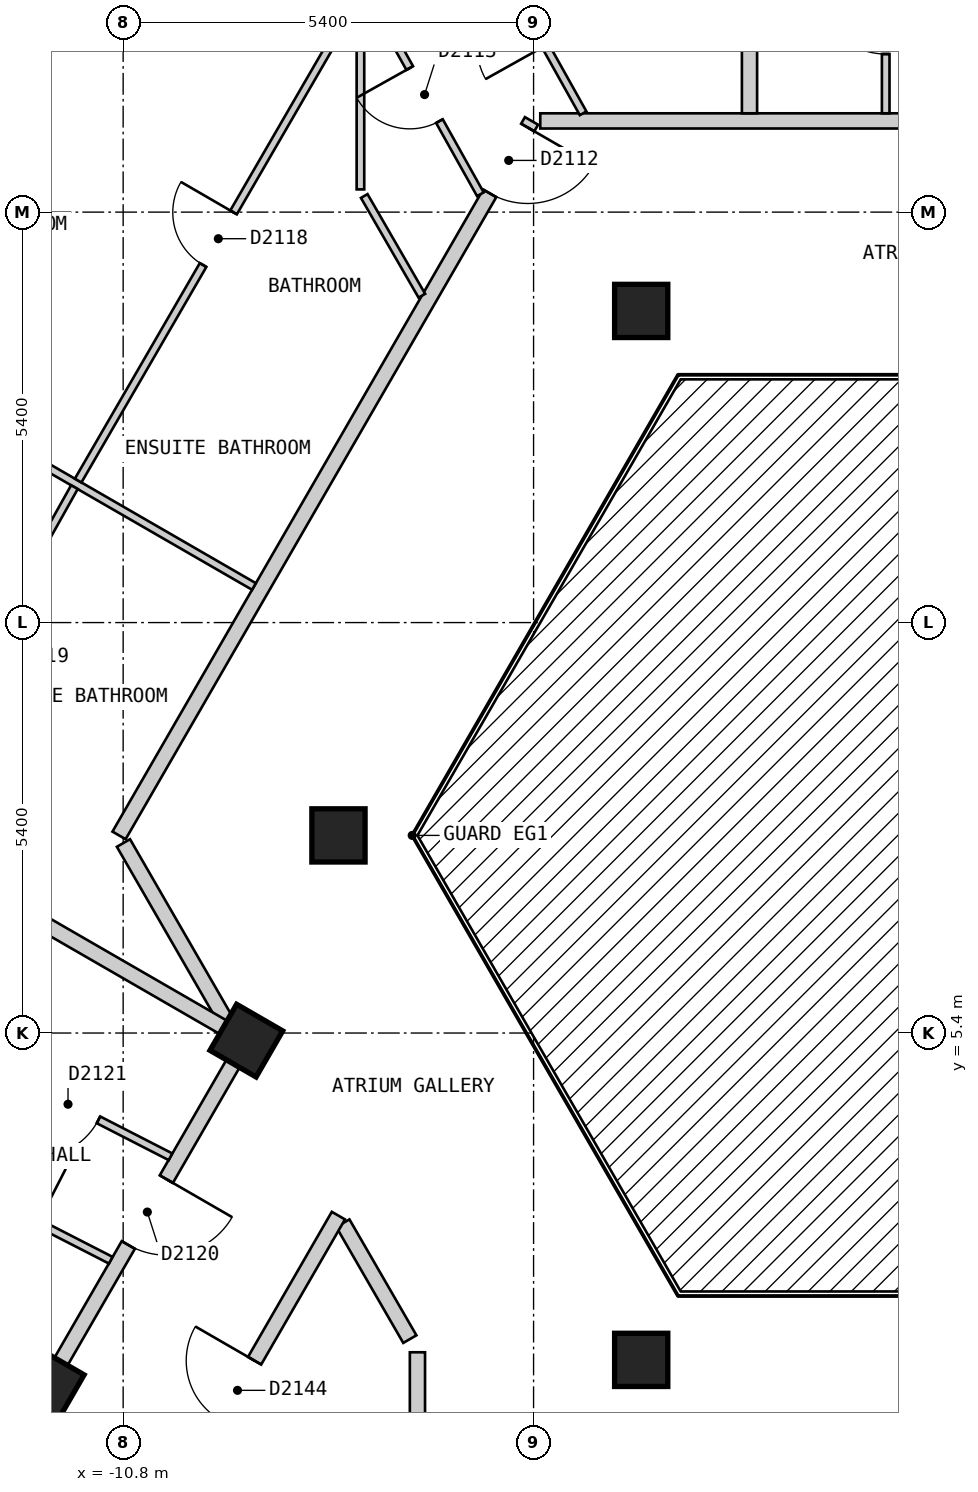
"""IFC4 building model, lengths in metres.
Left out: names, types, materials, properties, quantities, classifications, styles, units other than length and angle.
Written with IfcOpenShell. Run it as: python <this file> out.ifc"""

import sys

from ifc_helpers import new_model, si_unit, direction, frame, frame_2d, origin, origin_2d, place, context, subcontext, project, spatial, rectangle, extrude, element, fill, save


model = new_model("IFC4")
c1 = context("Model", 3, precision=1e-05, world=origin(), true_north=direction((0.0, 1.0)))
c2 = subcontext(c1, "Body", "Model", "MODEL_VIEW")
j1 = project(units=[si_unit("LENGTHUNIT", "METRE"), si_unit("PLANEANGLEUNIT", "RADIAN")], contexts=[c1])
p1 = place(None, origin())
s1 = spatial("IfcSite", under=j1, at=p1, CompositionType="ELEMENT")
p2 = place(p1, origin())
s2 = spatial("IfcBuilding", under=s1, at=p2, CompositionType="ELEMENT")
p3 = place(p2, frame((0.0, 0.0, 205.8)))
s3 = spatial("IfcBuildingStorey", under=s2, at=p3, CompositionType="ELEMENT", Elevation=205.8)
for number, where, z_axis, x_axis in (
    (1, (-3.984, 14.9, 0.0), (0.0, 0.0, 1.0), (1.0, 0.0, 0.0)),
    (2, (-7.967, 8.0, 0.0), (0.0, 0.0, 1.0), (1.0, 0.0, 0.0)),
    (3, (-9.179, 5.3, 0.0), (0.0, 0.0, 1.0), (-0.5, -0.866, 0.0)),
    (4, (-3.984, 1.1, 0.0), (0.0, 0.0, 1.0), (1.0, 0.0, 0.0)),
    (5, (-11.792, 0.775, 0.0), (0.0, 0.0, 1.0), (-0.5, -0.866, 0.0)),
):
    element("IfcColumn", number, at=place(p3, frame(where, z_axis=z_axis, x_axis=x_axis)), inside=s3, PredefinedType="COLUMN", context=c2, shape_type="SweptSolid", body=[
        extrude(rectangle(XDim=0.7, YDim=0.7, at=origin_2d()), origin(), (0.0, 0.0, 1.0), 3.0),
    ])
p4 = place(p3, frame((-10.796, 7.9, 0.0), z_axis=(0.0, 0.0, 1.0), x_axis=(0.499698840221, -0.866199208659, 0.0)))
e6 = element("IfcWall", 6, at=p4, inside=s3, PredefinedType="PARTITIONING", context=c2, shape_type="SweptSolid", body=[
    extrude(rectangle(XDim=2.685, YDim=0.2, at=frame_2d((1.343, 0.0))), origin(), (0.0, 0.0, 1.0), 2.7),
])
p5 = place(p3, frame((-7.909, 2.898, 0.0), z_axis=(0.0, 0.0, 1.0), x_axis=(0.50019444547, -0.865913111531, 0.0)))
e7 = element("IfcWall", 7, at=p5, inside=s3, PredefinedType="PARTITIONING", context=c2, shape_type="SweptSolid", body=[
    extrude(rectangle(XDim=1.761, YDim=0.2, at=frame_2d((0.88, 0.0))), origin(), (0.0, 0.0, 1.0), 2.7),
])
p6 = place(p3, frame((-5.312, 17.4, 0.0), z_axis=(0.0, 0.0, 1.0), x_axis=(1.0, 0.0, 0.0)))
e8 = element("IfcWall", 8, at=p6, inside=s3, PredefinedType="PARTITIONING", context=c2, shape_type="SweptSolid", body=[
    extrude(rectangle(XDim=10.739, YDim=0.2, at=frame_2d((5.37, 0.0))), origin(), (0.0, 0.0, 1.0), 2.7),
])
p7 = place(p6, frame((9.534, 0.0, 0.0)))
e9 = element("IfcOpeningElement", 9, at=p7, cuts=e8, PredefinedType="OPENING", context=c2, shape_type="SweptSolid", body=[
    extrude(rectangle(XDim=1.0, YDim=2.1, at=frame_2d((0.5, 1.05))), frame((0.0, 0.11, 0.0), z_axis=(0.0, -1.0, 0.0), x_axis=(1.0, 0.0, 0.0)), (0.0, 0.0, 1.0), 0.22),
])
p8 = place(p6, frame((4.812, 0.0, 0.0)))
e10 = element("IfcOpeningElement", 10, at=p8, cuts=e8, PredefinedType="OPENING", context=c2, shape_type="SweptSolid", body=[
    extrude(rectangle(XDim=1.0, YDim=2.1, at=frame_2d((0.5, 1.05))), frame((0.0, 0.11, 0.0), z_axis=(0.0, -1.0, 0.0), x_axis=(1.0, 0.0, 0.0)), (0.0, 0.0, 1.0), 0.22),
])
p9 = place(p3, frame((-10.623, -1.6, 0.0), z_axis=(0.0, 0.0, 1.0), x_axis=(0.500040865889, 0.866001808567, 0.0)))
e11 = element("IfcWall", 11, at=p9, inside=s3, PredefinedType="PARTITIONING", context=c2, shape_type="SweptSolid", body=[
    extrude(rectangle(XDim=5.31, YDim=0.2, at=frame_2d((2.655, 0.0))), origin(), (0.0, 0.0, 1.0), 2.7),
])
p10 = place(p9, frame((2.205, 0.0, 0.0)))
e12 = element("IfcOpeningElement", 12, at=p10, cuts=e11, PredefinedType="OPENING", context=c2, shape_type="SweptSolid", body=[
    extrude(rectangle(XDim=0.9, YDim=2.1, at=frame_2d((0.45, 1.05))), frame((0.0, 0.11, 0.0), z_axis=(0.0, -1.0, 0.0), x_axis=(1.0, 0.0, 0.0)), (0.0, 0.0, 1.0), 0.22),
])
p11 = place(p3, frame((-13.106, -1.5, 0.0), z_axis=(0.0, 0.0, 1.0), x_axis=(0.500025705601, 0.86601056214, 0.0)))
e13 = element("IfcWall", 13, at=p11, inside=s3, PredefinedType="PARTITIONING", context=c2, shape_type="SweptSolid", body=[
    extrude(rectangle(XDim=7.735, YDim=0.2, at=frame_2d((3.868, 0.0))), origin(), (0.0, 0.0, 1.0), 2.7),
])
p12 = place(p11, frame((4.748, 0.0, 0.0)))
e14 = element("IfcOpeningElement", 14, at=p12, cuts=e13, PredefinedType="OPENING", context=c2, shape_type="SweptSolid", body=[
    extrude(rectangle(XDim=1.0, YDim=2.1, at=frame_2d((0.5, 1.05))), frame((0.0, 0.11, 0.0), z_axis=(0.0, -1.0, 0.0), x_axis=(1.0, 0.0, 0.0)), (0.0, 0.0, 1.0), 0.22),
])
p13 = place(p3, frame((-10.854, 8.0, 0.0), z_axis=(0.0, 0.0, 1.0), x_axis=(0.499997637144, 0.866026767976, 0.0)))
e15 = element("IfcWall", 15, at=p13, inside=s3, PredefinedType="PARTITIONING", context=c2, shape_type="SweptSolid", body=[
    extrude(rectangle(XDim=10.854, YDim=0.2, at=frame_2d((5.427, 0.0))), origin(), (0.0, 0.0, 1.0), 2.7),
])
p14 = place(p13, frame((9.754, 0.0, 0.0)))
e16 = element("IfcOpeningElement", 16, at=p14, cuts=e15, PredefinedType="OPENING", context=c2, shape_type="SweptSolid", body=[
    extrude(rectangle(XDim=1.0, YDim=2.1, at=frame_2d((0.5, 1.05))), frame((0.0, 0.11, 0.0), z_axis=(0.0, -1.0, 0.0), x_axis=(1.0, 0.0, 0.0)), (0.0, 0.0, 1.0), 0.22),
])
p15 = place(p3, frame((-6.928, -2.799, 0.0), z_axis=(0.0, 0.0, 1.0), x_axis=(0.0, 1.0, 0.0)))
e17 = element("IfcWall", 17, at=p15, inside=s3, PredefinedType="PARTITIONING", context=c2, shape_type="SweptSolid", body=[
    extrude(rectangle(XDim=3.999, YDim=0.2, at=frame_2d((2.0, 0.0))), origin(), (0.0, 0.0, 1.0), 2.7),
])
p16 = place(p3, frame((-7.628, 16.412, 0.0), z_axis=(0.0, 0.0, 1.0), x_axis=(0.500159472144, -0.86593331292, 0.0)))
e18 = element("IfcWall", 18, at=p16, inside=s3, PredefinedType="PARTITIONING", context=c2, shape_type="SweptSolid", body=[
    extrude(rectangle(XDim=1.515, YDim=0.1, at=frame_2d((0.758, 0.0))), origin(), (0.0, 0.0, 1.0), 2.7),
])
p17 = place(p3, frame((-6.211, 20.115, 0.0), z_axis=(0.0, 0.0, 1.0), x_axis=(0.488221234931, -0.872719901092, 0.0)))
e19 = element("IfcWall", 19, at=p17, inside=s3, PredefinedType="PARTITIONING", context=c2, shape_type="SweptSolid", body=[
    extrude(rectangle(XDim=2.996, YDim=0.1, at=frame_2d((1.498, 0.0))), origin(), (0.0, 0.0, 1.0), 2.7),
])
p18 = place(p17, frame((1.077, 0.0, 0.0)))
e20 = element("IfcOpeningElement", 20, at=p18, cuts=e19, PredefinedType="OPENING", context=c2, shape_type="SweptSolid", body=[
    extrude(rectangle(XDim=0.9, YDim=2.1, at=frame_2d((0.45, 1.05))), frame((0.0, 0.06, 0.0), z_axis=(0.0, -1.0, 0.0), x_axis=(1.0, 0.0, 0.0)), (0.0, 0.0, 1.0), 0.12),
])
p19 = place(p3, frame((-7.575, 19.07, 0.0), z_axis=(0.0, 0.0, 1.0), x_axis=(0.488413788688, -0.872612153834, 0.0)))
e21 = element("IfcWall", 21, at=p19, inside=s3, PredefinedType="PARTITIONING", context=c2, shape_type="SweptSolid", body=[
    extrude(rectangle(XDim=3.02, YDim=0.1, at=frame_2d((1.51, 0.0))), origin(), (0.0, 0.0, 1.0), 2.7),
])
p20 = place(p19, frame((1.117, 0.0, 0.0)))
e22 = element("IfcOpeningElement", 22, at=p20, cuts=e21, PredefinedType="OPENING", context=c2, shape_type="SweptSolid", body=[
    extrude(rectangle(XDim=0.8, YDim=2.1, at=frame_2d((0.4, 1.05))), frame((0.0, 0.06, 0.0), z_axis=(0.0, -1.0, 0.0), x_axis=(1.0, 0.0, 0.0)), (0.0, 0.0, 1.0), 0.12),
])
p21 = place(p3, frame((-12.917, 5.177, 0.0), z_axis=(0.0, 0.0, 1.0), x_axis=(0.889829844516, -0.456292502467, 0.0)))
e23 = element("IfcWall", 23, at=p21, inside=s3, PredefinedType="PARTITIONING", context=c2, shape_type="SweptSolid", body=[
    extrude(rectangle(XDim=3.079, YDim=0.1, at=frame_2d((1.54, 0.0))), origin(), (0.0, 0.0, 1.0), 2.7),
])
p22 = place(p21, frame((1.114, 0.0, 0.0)))
e24 = element("IfcOpeningElement", 24, at=p22, cuts=e23, PredefinedType="OPENING", context=c2, shape_type="SweptSolid", body=[
    extrude(rectangle(XDim=0.9, YDim=2.1, at=frame_2d((0.45, 1.05))), frame((0.0, 0.06, 0.0), z_axis=(0.0, -1.0, 0.0), x_axis=(1.0, 0.0, 0.0)), (0.0, 0.0, 1.0), 0.12),
])
p23 = place(p3, frame((-13.634, 3.78, 0.0), z_axis=(0.0, 0.0, 1.0), x_axis=(0.889908901513, -0.456138298116, 0.0)))
e25 = element("IfcWall", 25, at=p23, inside=s3, PredefinedType="PARTITIONING", context=c2, shape_type="SweptSolid", body=[
    extrude(rectangle(XDim=3.002, YDim=0.1, at=frame_2d((1.501, 0.0))), origin(), (0.0, 0.0, 1.0), 2.7),
])
p24 = place(p23, frame((1.126, 0.0, 0.0)))
e26 = element("IfcOpeningElement", 26, at=p24, cuts=e25, PredefinedType="OPENING", context=c2, shape_type="SweptSolid", body=[
    extrude(rectangle(XDim=0.8, YDim=2.1, at=frame_2d((0.4, 1.05))), frame((0.0, 0.06, 0.0), z_axis=(0.0, -1.0, 0.0), x_axis=(1.0, 0.0, 0.0)), (0.0, 0.0, 1.0), 0.12),
])
p25 = place(p3, frame((-15.314, 14.875, 0.0), z_axis=(0.0, 0.0, 1.0), x_axis=(0.866001485781, -0.500041424909, 0.0)))
e27 = element("IfcWall", 27, at=p25, inside=s3, PredefinedType="PARTITIONING", context=c2, shape_type="SweptSolid", body=[
    extrude(rectangle(XDim=7.2, YDim=0.1, at=frame_2d((3.6, 0.0))), origin(), (0.0, 0.0, 1.0), 2.7),
])
p26 = place(p25, frame((1.8, 0.0, 0.0)))
e28 = element("IfcOpeningElement", 28, at=p26, cuts=e27, PredefinedType="OPENING", context=c2, shape_type="SweptSolid", body=[
    extrude(rectangle(XDim=0.9, YDim=2.1, at=frame_2d((0.45, 1.05))), frame((0.0, 0.06, 0.0), z_axis=(0.0, -1.0, 0.0), x_axis=(1.0, 0.0, 0.0)), (0.0, 0.0, 1.0), 0.12),
])
p27 = place(p3, frame((-11.392, 12.668, 0.0), z_axis=(0.0, 0.0, 1.0), x_axis=(0.501440551074, 0.865192102217, 0.0)))
e29 = element("IfcWall", 29, at=p27, inside=s3, PredefinedType="PARTITIONING", context=c2, shape_type="SweptSolid", body=[
    extrude(rectangle(XDim=7.307, YDim=0.1, at=frame_2d((3.654, 0.0))), origin(), (0.0, 0.0, 1.0), 2.7),
])
p28 = place(p27, frame((3.278, 0.0, 0.0)))
e30 = element("IfcOpeningElement", 30, at=p28, cuts=e29, PredefinedType="OPENING", context=c2, shape_type="SweptSolid", body=[
    extrude(rectangle(XDim=0.8, YDim=2.1, at=frame_2d((0.4, 1.05))), frame((0.0, 0.06, 0.0), z_axis=(0.0, -1.0, 0.0), x_axis=(1.0, 0.0, 0.0)), (0.0, 0.0, 1.0), 0.12),
])
p29 = place(p3, frame((-13.921, 8.153, 0.0), z_axis=(0.0, 0.0, 1.0), x_axis=(0.488568218554, 0.872525699231, 0.0)))
e31 = element("IfcWall", 31, at=p29, inside=s3, PredefinedType="PARTITIONING", context=c2, shape_type="SweptSolid", body=[
    extrude(rectangle(XDim=5.076, YDim=0.1, at=frame_2d((2.538, 0.0))), origin(), (0.0, 0.0, 1.0), 2.7),
])
p30 = place(p29, frame((2.113, 0.0, 0.0)))
e32 = element("IfcOpeningElement", 32, at=p30, cuts=e31, PredefinedType="OPENING", context=c2, shape_type="SweptSolid", body=[
    extrude(rectangle(XDim=0.8, YDim=2.1, at=frame_2d((0.4, 1.05))), frame((0.0, 0.06, 0.0), z_axis=(0.0, -1.0, 0.0), x_axis=(1.0, 0.0, 0.0)), (0.0, 0.0, 1.0), 0.12),
])
p31 = place(p3, frame((-7.678, 16.499, 0.0), z_axis=(0.0, 0.0, 1.0), x_axis=(0.0, 1.0, 0.0)))
e33 = element("IfcWall", 33, at=p31, inside=s3, PredefinedType="PARTITIONING", context=c2, shape_type="SweptSolid", body=[
    extrude(rectangle(XDim=5.801, YDim=0.1, at=frame_2d((2.9, 0.0))), origin(), (0.0, 0.0, 1.0), 2.7),
])
p32 = place(p31, frame((3.44, 0.0, 0.0)))
e34 = element("IfcOpeningElement", 34, at=p32, cuts=e33, PredefinedType="OPENING", context=c2, shape_type="SweptSolid", body=[
    extrude(rectangle(XDim=0.9, YDim=2.1, at=frame_2d((0.45, 1.05))), frame((0.0, 0.06, 0.0), z_axis=(0.0, -1.0, 0.0), x_axis=(1.0, 0.0, 0.0)), (0.0, 0.0, 1.0), 0.12),
])
p33 = place(p3, frame((-0.767, 17.5, 0.0), z_axis=(0.0, 0.0, 1.0), x_axis=(0.0, 1.0, 0.0)))
e35 = element("IfcWall", 35, at=p33, inside=s3, PredefinedType="PARTITIONING", context=c2, shape_type="SweptSolid", body=[
    extrude(rectangle(XDim=2.559, YDim=0.1, at=frame_2d((1.28, 0.0))), origin(), (0.0, 0.0, 1.0), 2.7),
])
p34 = place(p33, frame((0.78, 0.0, 0.0)))
e36 = element("IfcOpeningElement", 36, at=p34, cuts=e35, PredefinedType="OPENING", context=c2, shape_type="SweptSolid", body=[
    extrude(rectangle(XDim=0.9, YDim=2.1, at=frame_2d((0.45, 1.05))), frame((0.0, 0.06, 0.0), z_axis=(0.0, -1.0, 0.0), x_axis=(1.0, 0.0, 0.0)), (0.0, 0.0, 1.0), 0.12),
])
p35 = place(p3, frame((-2.559, 20.22, 0.0), z_axis=(0.0, 0.0, 1.0), x_axis=(0.0, -1.0, 0.0)))
e37 = element("IfcWall", 37, at=p35, inside=s3, PredefinedType="PARTITIONING", context=c2, shape_type="SweptSolid", body=[
    extrude(rectangle(XDim=2.72, YDim=0.2, at=frame_2d((1.36, 0.0))), origin(), (0.0, 0.0, 1.0), 2.7),
])
p36 = place(p3, frame((-17.926, 10.35, 0.0), z_axis=(0.0, 0.0, 1.0), x_axis=(0.866018411306, -0.500012111133, 0.0)))
e38 = element("IfcWall", 38, at=p36, inside=s3, PredefinedType="PARTITIONING", context=c2, shape_type="SweptSolid", body=[
    extrude(rectangle(XDim=9.898, YDim=0.2, at=frame_2d((4.949, 0.0))), origin(), (0.0, 0.0, 1.0), 2.7),
])
p37 = place(p34, origin())
e39 = element("IfcDoor", 39, at=p37, inside=s3, OperationType="SINGLE_SWING_RIGHT", PredefinedType="DOOR", context=c2, shape_type="SweptSolid", body=[
    extrude(rectangle(XDim=0.9, YDim=2.1, at=frame_2d((0.45, 1.05))), frame((0.0, 0.025, 0.0), z_axis=(0.0, -1.0, 0.0), x_axis=(1.0, 0.0, 0.0)), (0.0, 0.0, 1.0), 0.05),
])
fill(e36, e39)
p38 = place(p14, origin())
e40 = element("IfcDoor", 40, at=p38, inside=s3, OperationType="SINGLE_SWING_RIGHT", PredefinedType="DOOR", context=c2, shape_type="SweptSolid", body=[
    extrude(rectangle(XDim=1.0, YDim=2.1, at=frame_2d((0.5, 1.05))), frame((0.0, 0.025, 0.0), z_axis=(0.0, -1.0, 0.0), x_axis=(1.0, 0.0, 0.0)), (0.0, 0.0, 1.0), 0.05),
])
fill(e16, e40)
p39 = place(p20, origin())
e41 = element("IfcDoor", 41, at=p39, inside=s3, OperationType="SINGLE_SWING_LEFT", PredefinedType="DOOR", context=c2, shape_type="SweptSolid", body=[
    extrude(rectangle(XDim=0.8, YDim=2.1, at=frame_2d((0.4, 1.05))), frame((0.0, 0.025, 0.0), z_axis=(0.0, -1.0, 0.0), x_axis=(1.0, 0.0, 0.0)), (0.0, 0.0, 1.0), 0.05),
])
fill(e22, e41)
p40 = place(p28, origin())
e42 = element("IfcDoor", 42, at=p40, inside=s3, OperationType="SINGLE_SWING_RIGHT", PredefinedType="DOOR", context=c2, shape_type="SweptSolid", body=[
    extrude(rectangle(XDim=0.8, YDim=2.1, at=frame_2d((0.4, 1.05))), frame((0.0, 0.025, 0.0), z_axis=(0.0, -1.0, 0.0), x_axis=(1.0, 0.0, 0.0)), (0.0, 0.0, 1.0), 0.05),
])
fill(e30, e42)
p41 = place(p12, origin())
e43 = element("IfcDoor", 43, at=p41, inside=s3, OperationType="SINGLE_SWING_RIGHT", PredefinedType="DOOR", context=c2, shape_type="SweptSolid", body=[
    extrude(rectangle(XDim=1.0, YDim=2.1, at=frame_2d((0.5, 1.05))), frame((0.0, 0.025, 0.0), z_axis=(0.0, -1.0, 0.0), x_axis=(1.0, 0.0, 0.0)), (0.0, 0.0, 1.0), 0.05),
])
fill(e14, e43)
p42 = place(p22, origin())
e44 = element("IfcDoor", 44, at=p42, inside=s3, OperationType="SINGLE_SWING_LEFT", PredefinedType="DOOR", context=c2, shape_type="SweptSolid", body=[
    extrude(rectangle(XDim=0.9, YDim=2.1, at=frame_2d((0.45, 1.05))), frame((0.0, 0.025, 0.0), z_axis=(0.0, -1.0, 0.0), x_axis=(1.0, 0.0, 0.0)), (0.0, 0.0, 1.0), 0.05),
])
fill(e24, e44)
p43 = place(p10, origin())
e45 = element("IfcDoor", 45, at=p43, inside=s3, OperationType="SINGLE_SWING_RIGHT", PredefinedType="DOOR", context=c2, shape_type="SweptSolid", body=[
    extrude(rectangle(XDim=0.9, YDim=2.1, at=frame_2d((0.45, 1.05))), frame((0.0, 0.025, 0.0), z_axis=(0.0, -1.0, 0.0), x_axis=(1.0, 0.0, 0.0)), (0.0, 0.0, 1.0), 0.05),
])
fill(e12, e45)
save(model, sys.argv[1])
